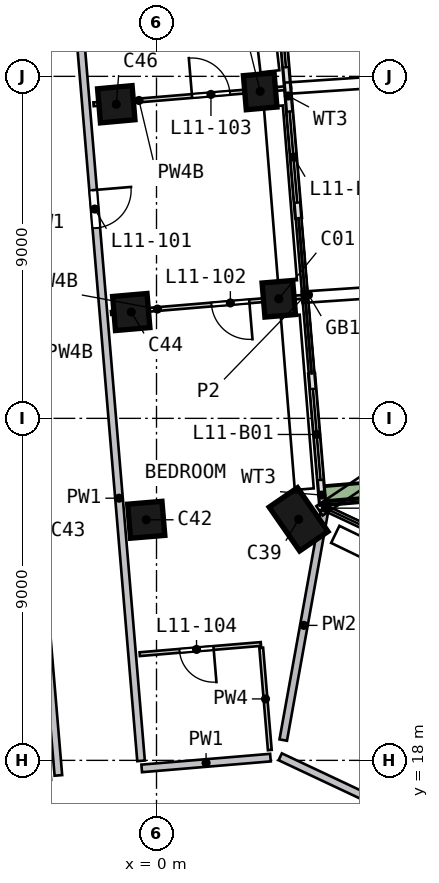
"""IFC4 building model, lengths in metres.
Left out: names, types, materials, properties, quantities, classifications, styles, units other than length and angle.
Written with IfcOpenShell. Run it as: python <this file> out.ifc"""

import sys

from ifc_helpers import new_model, si_unit, direction, frame, frame_2d, origin, origin_2d, place, context, subcontext, project, spatial, rectangle, extrude, element, fill, save


model = new_model("IFC4")
c1 = context("Model", 3, precision=1e-05, world=origin(), true_north=direction((0.0, 1.0)))
c2 = subcontext(c1, "Body", "Model", "MODEL_VIEW")
j1 = project(units=[si_unit("LENGTHUNIT", "METRE"), si_unit("PLANEANGLEUNIT", "RADIAN")], contexts=[c1])
p1 = place(None, origin())
s1 = spatial("IfcSite", under=j1, at=p1, CompositionType="ELEMENT")
p2 = place(p1, origin())
s2 = spatial("IfcBuilding", under=s1, at=p2, CompositionType="ELEMENT")
p3 = place(p2, frame((0.0, 0.0, 53.0)))
s3 = spatial("IfcBuildingStorey", under=s2, at=p3, CompositionType="ELEMENT", Elevation=53.0)
p4 = place(p3, frame((3.388, 30.158, 0.0), z_axis=(-0.140555407, -0.009698702, 0.990025309), x_axis=(-0.083368009, 0.996516671, -0.00207359)))
e1 = element("IfcColumn", 1, at=p4, inside=s3, PredefinedType="COLUMN", context=c2, shape_type="SweptSolid", body=[
    extrude(rectangle(XDim=0.9, YDim=0.8, at=origin_2d()), origin(), (0.0, 0.0, 1.0), 3.222),
])
p5 = place(p3, frame((2.927, 35.65, 0.0), z_axis=(-0.163432759, -0.036519601, 0.985878315), x_axis=(-0.087423938, 0.995919345, 0.022398952)))
e2 = element("IfcColumn", 2, at=p5, inside=s3, PredefinedType="COLUMN", context=c2, shape_type="SweptSolid", body=[
    extrude(rectangle(XDim=0.9, YDim=0.8, at=origin_2d()), origin(), (0.0, 0.0, 1.0), 3.236),
])
p6 = place(p3, frame((3.878, 24.322, 0.0), z_axis=(-0.115760507, 0.017481889, 0.9931233), x_axis=(0.563120389, -0.822482073, 0.08011658)))
e3 = element("IfcColumn", 3, at=p6, inside=s3, PredefinedType="COLUMN", context=c2, shape_type="SweptSolid", body=[
    extrude(rectangle(XDim=1.4, YDim=0.9, at=origin_2d()), origin(), (0.0, 0.0, 1.0), 3.212),
])
p7 = place(p3, frame((-0.13, 24.333, 0.0), z_axis=(-0.115703051, -0.001596428, 0.993282566), x_axis=(-0.082814244, 0.996532528, -0.00804501)))
e4 = element("IfcColumn", 4, at=p7, inside=s3, PredefinedType="COLUMN", context=c2, shape_type="SweptSolid", body=[
    extrude(rectangle(XDim=0.9, YDim=0.9, at=origin_2d()), origin(), (0.0, 0.0, 1.0), 3.211),
])
p8 = place(p3, frame((-0.496, 29.832, 0.0), z_axis=(-0.138872449, -0.028107844, 0.989911305), x_axis=(-0.086044465, 0.996159348, 0.016214267)))
e5 = element("IfcColumn", 5, at=p8, inside=s3, PredefinedType="COLUMN", context=c2, shape_type="SweptSolid", body=[
    extrude(rectangle(XDim=0.9, YDim=0.9, at=origin_2d()), origin(), (0.0, 0.0, 1.0), 3.222),
])
p9 = place(p3, frame((-0.862, 35.332, 0.0), z_axis=(-0.161759103, -0.054296762, 0.985335402), x_axis=(-0.089864726, 0.995147, 0.040084647)))
e6 = element("IfcColumn", 6, at=p9, inside=s3, PredefinedType="COLUMN", context=c2, shape_type="SweptSolid", body=[
    extrude(rectangle(XDim=0.9, YDim=0.9, at=origin_2d()), origin(), (0.0, 0.0, 1.0), 3.237),
])
p10 = place(p3, frame((4.367, 24.781, 0.0), z_axis=(0.0, 0.0, 1.0), x_axis=(-0.083674993, 0.996493099, 0.0)))
e7 = element("IfcWall", 7, at=p10, inside=s3, PredefinedType="SOLIDWALL", context=c2, shape_type="SweptSolid", body=[
    extrude(rectangle(XDim=3.402, YDim=0.15, at=frame_2d((1.701, 0.0))), origin(), (0.0, 0.0, 1.0), 2.425),
])
p11 = place(p10, frame((0.602, 0.0, 0.0)))
e8 = element("IfcOpeningElement", 8, at=p11, cuts=e7, PredefinedType="OPENING", context=c2, shape_type="SweptSolid", body=[
    extrude(rectangle(XDim=2.4, YDim=2.4, at=frame_2d((1.2, 1.2))), frame((0.0, 0.085, 0.0), z_axis=(0.0, -1.0, 0.0), x_axis=(1.0, 0.0, 0.0)), (0.0, 0.0, 1.0), 0.17),
])
p12 = place(p3, frame((3.737, 32.282, 0.0), z_axis=(0.0, 0.0, 1.0), x_axis=(-0.083718236, 0.996489467, 0.0)))
e9 = element("IfcWall", 9, at=p12, inside=s3, PredefinedType="SOLIDWALL", context=c2, shape_type="SweptSolid", body=[
    extrude(rectangle(XDim=3.424, YDim=0.15, at=frame_2d((1.712, 0.0))), origin(), (0.0, 0.0, 1.0), 2.425),
])
p13 = place(p12, frame((0.4, 0.0, 0.0)))
e10 = element("IfcOpeningElement", 10, at=p13, cuts=e9, PredefinedType="OPENING", context=c2, shape_type="SweptSolid", body=[
    extrude(rectangle(XDim=2.4, YDim=2.4, at=frame_2d((1.2, 1.2))), frame((0.0, 0.085, 0.0), z_axis=(0.0, -1.0, 0.0), x_axis=(1.0, 0.0, 0.0)), (0.0, 0.0, 1.0), 0.17),
])
p14 = place(p3, frame((3.45, 35.694, 0.0), z_axis=(0.0, 0.0, 1.0), x_axis=(-0.083606255, 0.996498868, 0.0)))
e11 = element("IfcWall", 11, at=p14, inside=s3, PredefinedType="SOLIDWALL", context=c2, shape_type="SweptSolid", body=[
    extrude(rectangle(XDim=2.45, YDim=0.15, at=frame_2d((1.225, 0.0))), origin(), (0.0, 0.0, 1.0), 2.425),
])
p15 = place(p14, frame((0.55, 0.0, 0.0)))
e12 = element("IfcOpeningElement", 12, at=p15, cuts=e11, PredefinedType="OPENING", context=c2, shape_type="SweptSolid", body=[
    extrude(rectangle(XDim=1.5, YDim=2.4, at=frame_2d((0.75, 1.2))), frame((0.0, 0.085, 0.0), z_axis=(0.0, -1.0, 0.0), x_axis=(1.0, 0.0, 0.0)), (0.0, 0.0, 1.0), 0.17),
])
p16 = place(p3, frame((4.427, 24.966, 0.0), z_axis=(0.0, 0.0, 1.0), x_axis=(0.996489211, 0.083721273, 0.0)))
e13 = element("IfcWall", 13, at=p16, inside=s3, PredefinedType="SOLIDWALL", context=c2, shape_type="SweptSolid", body=[
    extrude(rectangle(XDim=3.199, YDim=0.5, at=frame_2d((1.6, 0.0))), origin(), (0.0, 0.0, 1.0), 0.7),
])
p17 = place(p3, frame((-2.582, 17.604, 0.0), z_axis=(0.0, 0.0, 1.0), x_axis=(-0.083684956, 0.996492262, 0.0)))
e14 = element("IfcWall", 14, at=p17, inside=s3, PredefinedType="SOLIDWALL", context=c2, shape_type="SweptSolid", body=[
    extrude(rectangle(XDim=23.033, YDim=0.2, at=frame_2d((11.516, 0.0))), origin(), (0.0, 0.0, 1.0), 3.19),
])
p18 = place(p17, frame((4.95, 0.0, 0.0)))
e15 = element("IfcOpeningElement", 15, at=p18, cuts=e14, PredefinedType="OPENING", context=c2, shape_type="SweptSolid", body=[
    extrude(rectangle(XDim=1.0, YDim=2.1, at=frame_2d((0.5, 1.05))), frame((0.0, 0.11, 0.0), z_axis=(0.0, -1.0, 0.0), x_axis=(1.0, 0.0, 0.0)), (0.0, 0.0, 1.0), 0.22),
])
p19 = place(p3, frame((-2.317, 40.74, 0.0), z_axis=(0.0, 0.0, 1.0), x_axis=(0.083679937, -0.996492683, 0.0)))
e16 = element("IfcWall", 16, at=p19, inside=s3, PredefinedType="SOLIDWALL", context=c2, shape_type="SweptSolid", body=[
    extrude(rectangle(XDim=22.833, YDim=0.2, at=frame_2d((11.417, 0.0))), origin(), (0.0, 0.0, 1.0), 3.19),
])
p20 = place(p19, frame((7.761, 0.0, 0.0)))
e17 = element("IfcOpeningElement", 17, at=p20, cuts=e16, PredefinedType="OPENING", context=c2, shape_type="SweptSolid", body=[
    extrude(rectangle(XDim=1.0, YDim=2.1, at=frame_2d((0.5, 1.05))), frame((0.0, 0.11, 0.0), z_axis=(0.0, -1.0, 0.0), x_axis=(1.0, 0.0, 0.0)), (0.0, 0.0, 1.0), 0.22),
])
p21 = place(p3, frame((2.998, 18.073, 0.0), z_axis=(0.0, 0.0, 1.0), x_axis=(-0.996495064, -0.083651589, 0.0)))
e18 = element("IfcWall", 18, at=p21, inside=s3, PredefinedType="SOLIDWALL", context=c2, shape_type="SweptSolid", body=[
    extrude(rectangle(XDim=3.4, YDim=0.2, at=frame_2d((1.7, 0.0))), origin(), (0.0, 0.0, 1.0), 3.19),
])
p22 = place(p3, frame((11.866, 14.042, 0.0), z_axis=(0.0, 0.0, 1.0), x_axis=(-0.90483033, 0.425772326, 0.0)))
e19 = element("IfcWall", 19, at=p22, inside=s3, PredefinedType="SOLIDWALL", context=c2, shape_type="SweptSolid", body=[
    extrude(rectangle(XDim=9.516, YDim=0.2, at=frame_2d((4.758, 0.0))), origin(), (0.0, 0.0, 1.0), 3.19),
])
p23 = place(p3, frame((4.421, 24.57, 0.0), z_axis=(0.0, 0.0, 1.0), x_axis=(-0.177091295, -0.984194429, 0.0)))
e20 = element("IfcWall", 20, at=p23, inside=s3, PredefinedType="SOLIDWALL", context=c2, shape_type="SweptSolid", body=[
    extrude(rectangle(XDim=6.132, YDim=0.2, at=frame_2d((3.066, 0.0))), origin(), (0.0, 0.0, 1.0), 3.19),
])
p24 = place(p3, frame((-1.657, 35.265, 0.0), z_axis=(0.0, 0.0, 1.0), x_axis=(0.996492206, 0.08368562, 0.0)))
e21 = element("IfcWall", 21, at=p24, inside=s3, PredefinedType="PARTITIONING", context=c2, shape_type="SweptSolid", body=[
    extrude(rectangle(XDim=5.05, YDim=0.1, at=frame_2d((2.525, 0.0))), origin(), (0.0, 0.0, 1.0), 2.69),
])
p25 = place(p24, frame((2.6, 0.0, 0.0)))
e22 = element("IfcOpeningElement", 22, at=p25, cuts=e21, PredefinedType="OPENING", context=c2, shape_type="SweptSolid", body=[
    extrude(rectangle(XDim=1.0, YDim=2.1, at=frame_2d((0.5, 1.05))), frame((0.0, 0.06, 0.0), z_axis=(0.0, -1.0, 0.0), x_axis=(1.0, 0.0, 0.0)), (0.0, 0.0, 1.0), 0.12),
])
p26 = place(p3, frame((2.747, 21.062, 0.0), z_axis=(0.0, 0.0, 1.0), x_axis=(-0.996491885, -0.08368945, 0.0)))
e23 = element("IfcWall", 23, at=p26, inside=s3, PredefinedType="PARTITIONING", context=c2, shape_type="SweptSolid", body=[
    extrude(rectangle(XDim=3.2, YDim=0.1, at=frame_2d((1.6, 0.0))), origin(), (0.0, 0.0, 1.0), 3.19),
])
p27 = place(p26, frame((1.25, 0.0, 0.0)))
e24 = element("IfcOpeningElement", 24, at=p27, cuts=e23, PredefinedType="OPENING", context=c2, shape_type="SweptSolid", body=[
    extrude(rectangle(XDim=0.9, YDim=2.1, at=frame_2d((0.45, 1.05))), frame((0.0, 0.06, 0.0), z_axis=(0.0, -1.0, 0.0), x_axis=(1.0, 0.0, 0.0)), (0.0, 0.0, 1.0), 0.12),
])
p28 = place(p3, frame((3.837, 30.196, 0.0), z_axis=(0.0, 0.0, 1.0), x_axis=(-0.996492206, -0.08368562, 0.0)))
e25 = element("IfcWall", 25, at=p28, inside=s3, PredefinedType="PARTITIONING", context=c2, shape_type="SweptSolid", body=[
    extrude(rectangle(XDim=5.05, YDim=0.1, at=frame_2d((2.525, 0.0))), origin(), (0.0, 0.0, 1.0), 2.69),
])
p29 = place(p28, frame((1.4, 0.0, 0.0)))
e26 = element("IfcOpeningElement", 26, at=p29, cuts=e25, PredefinedType="OPENING", context=c2, shape_type="SweptSolid", body=[
    extrude(rectangle(XDim=1.0, YDim=2.1, at=frame_2d((0.5, 1.05))), frame((0.0, 0.06, 0.0), z_axis=(0.0, -1.0, 0.0), x_axis=(1.0, 0.0, 0.0)), (0.0, 0.0, 1.0), 0.12),
])
p30 = place(p3, frame((2.981, 18.272, 0.0), z_axis=(0.0, 0.0, 1.0), x_axis=(-0.083644148, 0.996495688, 0.0)))
e27 = element("IfcWall", 27, at=p30, inside=s3, PredefinedType="PARTITIONING", context=c2, shape_type="SweptSolid", body=[
    extrude(rectangle(XDim=2.7, YDim=0.1, at=frame_2d((1.35, 0.0))), origin(), (0.0, 0.0, 1.0), 3.19),
])
p31 = place(p11, origin())
e28 = element("IfcDoor", 28, at=p31, inside=s3, OperationType="SLIDING_TO_LEFT", PredefinedType="DOOR", context=c2, shape_type="SweptSolid", body=[
    extrude(rectangle(XDim=2.4, YDim=2.4, at=frame_2d((1.2, 1.2))), frame((0.0, 0.025, 0.0), z_axis=(0.0, -1.0, 0.0), x_axis=(1.0, 0.0, 0.0)), (0.0, 0.0, 1.0), 0.05),
])
fill(e8, e28)
p32 = place(p13, origin())
e29 = element("IfcDoor", 29, at=p32, inside=s3, OperationType="SLIDING_TO_RIGHT", PredefinedType="DOOR", context=c2, shape_type="SweptSolid", body=[
    extrude(rectangle(XDim=2.4, YDim=2.4, at=frame_2d((1.2, 1.2))), frame((0.0, 0.025, 0.0), z_axis=(0.0, -1.0, 0.0), x_axis=(1.0, 0.0, 0.0)), (0.0, 0.0, 1.0), 0.05),
])
fill(e10, e29)
p33 = place(p15, origin())
e30 = element("IfcDoor", 30, at=p33, inside=s3, OperationType="SLIDING_TO_LEFT", PredefinedType="DOOR", context=c2, shape_type="SweptSolid", body=[
    extrude(rectangle(XDim=1.5, YDim=2.4, at=frame_2d((0.75, 1.2))), frame((0.0, 0.025, 0.0), z_axis=(0.0, -1.0, 0.0), x_axis=(1.0, 0.0, 0.0)), (0.0, 0.0, 1.0), 0.05),
])
fill(e12, e30)
p34 = place(p20, origin())
e31 = element("IfcDoor", 31, at=p34, inside=s3, OperationType="SINGLE_SWING_LEFT", PredefinedType="DOOR", context=c2, shape_type="SweptSolid", body=[
    extrude(rectangle(XDim=1.0, YDim=2.1, at=frame_2d((0.5, 1.05))), frame((0.0, 0.025, 0.0), z_axis=(0.0, -1.0, 0.0), x_axis=(1.0, 0.0, 0.0)), (0.0, 0.0, 1.0), 0.05),
])
fill(e17, e31)
p35 = place(p29, origin())
e32 = element("IfcDoor", 32, at=p35, inside=s3, OperationType="SINGLE_SWING_LEFT", PredefinedType="DOOR", context=c2, shape_type="SweptSolid", body=[
    extrude(rectangle(XDim=1.0, YDim=2.1, at=frame_2d((0.5, 1.05))), frame((0.0, 0.025, 0.0), z_axis=(0.0, -1.0, 0.0), x_axis=(1.0, 0.0, 0.0)), (0.0, 0.0, 1.0), 0.05),
])
fill(e26, e32)
p36 = place(p25, origin())
e33 = element("IfcDoor", 33, at=p36, inside=s3, OperationType="SINGLE_SWING_LEFT", PredefinedType="DOOR", context=c2, shape_type="SweptSolid", body=[
    extrude(rectangle(XDim=1.0, YDim=2.1, at=frame_2d((0.5, 1.05))), frame((0.0, 0.025, 0.0), z_axis=(0.0, -1.0, 0.0), x_axis=(1.0, 0.0, 0.0)), (0.0, 0.0, 1.0), 0.05),
])
fill(e22, e33)
p37 = place(p27, origin())
e34 = element("IfcDoor", 34, at=p37, inside=s3, OperationType="SINGLE_SWING_LEFT", PredefinedType="DOOR", context=c2, shape_type="SweptSolid", body=[
    extrude(rectangle(XDim=0.9, YDim=2.1, at=frame_2d((0.45, 1.05))), frame((0.0, 0.025, 0.0), z_axis=(0.0, -1.0, 0.0), x_axis=(1.0, 0.0, 0.0)), (0.0, 0.0, 1.0), 0.05),
])
fill(e24, e34)
save(model, sys.argv[1])
